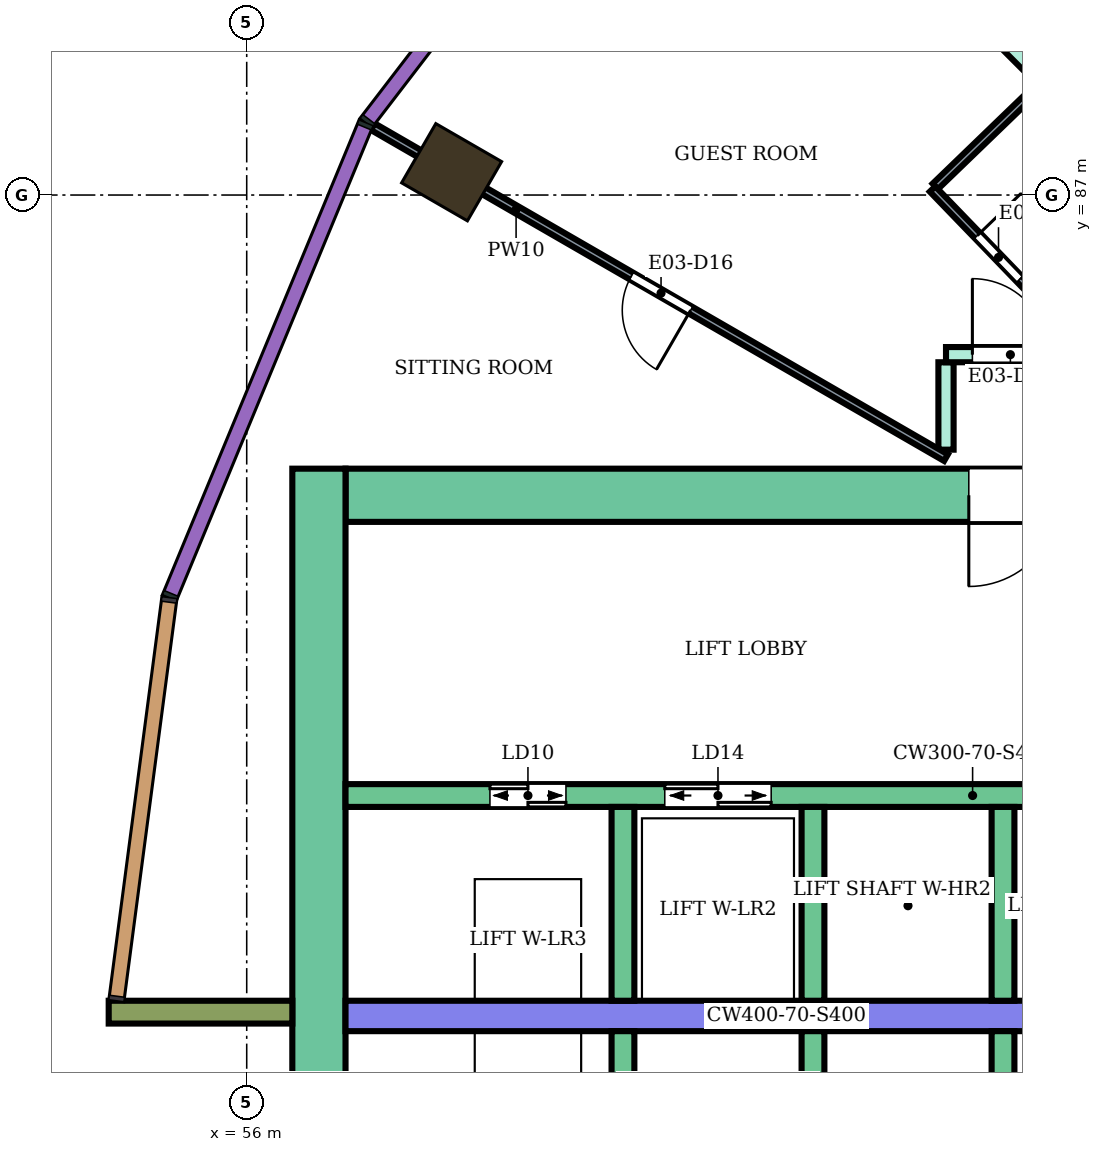
"""IFC4 building model, lengths in metres.
Left out: names, types, materials, properties, quantities, classifications, styles, units other than length and angle.
Written with IfcOpenShell. Run it as: python <this file> out.ifc"""

import sys

from ifc_helpers import new_model, si_unit, direction, frame, frame_2d, origin, origin_2d, place, context, subcontext, project, spatial, rectangle, extrude, element, fill, save


model = new_model("IFC4")
c1 = context("Model", 3, precision=1e-05, world=origin(), true_north=direction((0.0, 1.0)))
c2 = subcontext(c1, "Body", "Model", "MODEL_VIEW")
j1 = project(units=[si_unit("LENGTHUNIT", "METRE"), si_unit("PLANEANGLEUNIT", "RADIAN")], contexts=[c1])
p1 = place(None, origin())
s1 = spatial("IfcSite", under=j1, at=p1, CompositionType="ELEMENT")
p2 = place(p1, origin())
s2 = spatial("IfcBuilding", under=s1, at=p2, CompositionType="ELEMENT")
p3 = place(p2, frame((0.0, 0.0, 145.8)))
s3 = spatial("IfcBuildingStorey", under=s2, at=p3, CompositionType="ELEMENT", Elevation=145.8)
p4 = place(p3, frame((58.696, 87.3, 0.0), z_axis=(0.0, 0.0, 1.0), x_axis=(-0.866025403784, 0.5, 0.0)))
e1 = element("IfcColumn", 1, at=p4, inside=s3, PredefinedType="COLUMN", context=c2, shape_type="SweptSolid", body=[
    extrude(rectangle(XDim=1.0, YDim=0.9, at=origin_2d()), origin(), (0.0, 0.0, 1.0), 3.9),
])
p5 = place(p3, frame((72.1, 83.05, 0.0), z_axis=(0.0, 0.0, 1.0), x_axis=(-1.0, 0.0, 0.0)))
e2 = element("IfcWall", 2, at=p5, inside=s3, PredefinedType="SHEAR", context=c2, shape_type="SweptSolid", body=[
    extrude(rectangle(XDim=14.8, YDim=0.7, at=frame_2d((7.4, 0.0))), origin(), (0.0, 0.0, 1.0), 3.5),
])
p6 = place(p5, frame((4.2, 0.0, 0.0)))
e3 = element("IfcOpeningElement", 3, at=p6, cuts=e2, PredefinedType="OPENING", context=c2, shape_type="SweptSolid", body=[
    extrude(rectangle(XDim=2.4, YDim=2.4, at=frame_2d((1.2, 1.2))), frame((0.0, 0.36, 0.0), z_axis=(0.0, -1.0, 0.0), x_axis=(1.0, 0.0, 0.0)), (0.0, 0.0, 1.0), 0.72),
])
p7 = place(p3, frame((56.95, 83.4, 0.0), z_axis=(0.0, 0.0, 1.0), x_axis=(0.0, -1.0, 0.0)))
e4 = element("IfcWall", 4, at=p7, inside=s3, PredefinedType="SHEAR", context=c2, shape_type="SweptSolid", body=[
    extrude(rectangle(XDim=16.8, YDim=0.7, at=frame_2d((8.4, 0.0))), origin(), (0.0, 0.0, 1.0), 3.5),
])
p8 = place(p3, frame((68.3, 76.2, 0.0), z_axis=(0.0, 0.0, 1.0), x_axis=(-1.0, 0.0, 0.0)))
e5 = element("IfcWall", 5, at=p8, inside=s3, PredefinedType="SHEAR", context=c2, shape_type="SweptSolid", body=[
    extrude(rectangle(XDim=11.0, YDim=0.4, at=frame_2d((5.5, 0.0))), origin(), (0.0, 0.0, 1.0), 3.5),
])
p9 = place(p3, frame((68.3, 79.1, 0.0), z_axis=(0.0, 0.0, 1.0), x_axis=(-1.0, 0.0, 0.0)))
e6 = element("IfcWall", 6, at=p9, inside=s3, PredefinedType="SHEAR", context=c2, shape_type="SweptSolid", body=[
    extrude(rectangle(XDim=11.0, YDim=0.3, at=frame_2d((5.5, 0.0))), origin(), (0.0, 0.0, 1.0), 3.5),
])
p10 = place(p9, frame((0.4, 0.0, 0.0)))
e7 = element("IfcOpeningElement", 7, at=p10, cuts=e6, PredefinedType="OPENING", context=c2, shape_type="SweptSolid", body=[
    extrude(rectangle(XDim=1.4, YDim=2.1, at=frame_2d((0.7, 1.05))), frame((0.0, 0.16, 0.0), z_axis=(0.0, -1.0, 0.0), x_axis=(1.0, 0.0, 0.0)), (0.0, 0.0, 1.0), 0.32),
])
p11 = place(p9, frame((5.4, 0.0, 0.0)))
e8 = element("IfcOpeningElement", 8, at=p11, cuts=e6, PredefinedType="OPENING", context=c2, shape_type="SweptSolid", body=[
    extrude(rectangle(XDim=1.4, YDim=2.1, at=frame_2d((0.7, 1.05))), frame((0.0, 0.16, 0.0), z_axis=(0.0, -1.0, 0.0), x_axis=(1.0, 0.0, 0.0)), (0.0, 0.0, 1.0), 0.32),
])
p12 = place(p9, frame((8.1, 0.0, 0.0)))
e9 = element("IfcOpeningElement", 9, at=p12, cuts=e6, PredefinedType="OPENING", context=c2, shape_type="SweptSolid", body=[
    extrude(rectangle(XDim=1.0, YDim=2.1, at=frame_2d((0.5, 1.05))), frame((0.0, 0.16, 0.0), z_axis=(0.0, -1.0, 0.0), x_axis=(1.0, 0.0, 0.0)), (0.0, 0.0, 1.0), 0.32),
])
for number, where, z_axis, x_axis in (
    (10, (65.95, 76.0, 0.0), (0.0, 0.0, 1.0), (0.0, -1.0, 0.0)),
    (11, (63.45, 76.0, 0.0), (0.0, 0.0, 1.0), (0.0, -1.0, 0.0)),
    (12, (60.95, 76.0, 0.0), (0.0, 0.0, 1.0), (0.0, -1.0, 0.0)),
    (13, (65.95, 78.95, 0.0), (0.0, 0.0, 1.0), (0.0, -1.0, 0.0)),
    (14, (63.45, 78.95, 0.0), (0.0, 0.0, 1.0), (0.0, -1.0, 0.0)),
    (15, (60.95, 78.95, 0.0), (0.0, 0.0, 1.0), (0.0, -1.0, 0.0)),
):
    element("IfcWall", number, at=place(p3, frame(where, z_axis=z_axis, x_axis=x_axis)), inside=s3, PredefinedType="SHEAR", context=c2, shape_type="SweptSolid", body=[
        extrude(rectangle(XDim=2.55, YDim=0.3, at=frame_2d((1.275, 0.0))), origin(), (0.0, 0.0, 1.0), 3.5),
    ])
p13 = place(p3, frame((56.6, 76.25, 0.0), z_axis=(0.0, 0.0, 1.0), x_axis=(-1.0, 0.0, 0.0)))
e16 = element("IfcWall", 16, at=p13, inside=s3, PredefinedType="NOTDEFINED", context=c2, shape_type="SweptSolid", body=[
    extrude(rectangle(XDim=2.416, YDim=0.3, at=frame_2d((1.208, 0.0))), origin(), (0.0, 0.0, 1.0), 3.9),
])
p14 = place(p3, frame((63.596, 91.406, 0.0), z_axis=(0.0, 0.0, 1.0), x_axis=(0.706963264491, -0.707250268759, 0.0)))
e17 = element("IfcWall", 17, at=p14, inside=s3, PredefinedType="PARTITIONING", context=c2, shape_type="SweptSolid", body=[
    extrude(rectangle(XDim=6.805, YDim=0.2, at=frame_2d((3.403, 0.0))), origin(), (0.0, 0.0, 1.0), 3.45),
])
p15 = place(p3, frame((65.2, 83.65, 0.0), z_axis=(0.0, 0.0, 1.0), x_axis=(0.0, 1.0, 0.0)))
e18 = element("IfcWall", 18, at=p15, inside=s3, PredefinedType="PARTITIONING", context=c2, shape_type="SweptSolid", body=[
    extrude(rectangle(XDim=1.15, YDim=0.2, at=frame_2d((0.575, 0.0))), origin(), (0.0, 0.0, 1.0), 3.45),
])
p16 = place(p3, frame((65.2, 84.9, 0.0), z_axis=(0.0, 0.0, 1.0), x_axis=(1.0, 0.0, 0.0)))
e19 = element("IfcWall", 19, at=p16, inside=s3, PredefinedType="PARTITIONING", context=c2, shape_type="SweptSolid", body=[
    extrude(rectangle(XDim=1.537, YDim=0.2, at=frame_2d((0.769, 0.0))), origin(), (0.0, 0.0, 1.0), 3.45),
])
p17 = place(p16, frame((0.347, 0.0, 0.0)))
e20 = element("IfcOpeningElement", 20, at=p17, cuts=e19, PredefinedType="OPENING", context=c2, shape_type="SweptSolid", body=[
    extrude(rectangle(XDim=1.0, YDim=2.1, at=frame_2d((0.5, 1.05))), frame((0.0, 0.11, 0.0), z_axis=(0.0, -1.0, 0.0), x_axis=(1.0, 0.0, 0.0)), (0.0, 0.0, 1.0), 0.22),
])
p18 = place(p3, frame((57.659, 87.899, 0.0), z_axis=(0.0, 0.0, 1.0), x_axis=(0.86602264145, -0.500004784474, 0.0)))
e21 = element("IfcWall", 21, at=p18, inside=s3, PredefinedType="PARTITIONING", context=c2, shape_type="SweptSolid", body=[
    extrude(rectangle(XDim=8.708, YDim=0.1, at=frame_2d((4.354, 0.0))), origin(), (0.0, 0.0, 1.0), 3.45),
])
p19 = place(p18, frame((3.929, 0.0, 0.0)))
e22 = element("IfcOpeningElement", 22, at=p19, cuts=e21, PredefinedType="OPENING", context=c2, shape_type="SweptSolid", body=[
    extrude(rectangle(XDim=0.9, YDim=2.1, at=frame_2d((0.45, 1.05))), frame((0.0, 0.06, 0.0), z_axis=(0.0, -1.0, 0.0), x_axis=(1.0, 0.0, 0.0)), (0.0, 0.0, 1.0), 0.12),
])
p20 = place(p3, frame((65.059, 87.114, 0.0), z_axis=(0.0, 0.0, 1.0), x_axis=(0.719653890619, 0.694332973232, 0.0)))
e23 = element("IfcWall", 23, at=p20, inside=s3, PredefinedType="PARTITIONING", context=c2, shape_type="SweptSolid", body=[
    extrude(rectangle(XDim=1.899, YDim=0.1, at=frame_2d((0.95, 0.0))), origin(), (0.0, 0.0, 1.0), 3.45),
])
p21 = place(p3, frame((65.023, 87.079, 0.0), z_axis=(0.0, 0.0, 1.0), x_axis=(0.694287838235, -0.719697434815, 0.0)))
e24 = element("IfcWall", 24, at=p21, inside=s3, PredefinedType="PARTITIONING", context=c2, shape_type="SweptSolid", body=[
    extrude(rectangle(XDim=2.7, YDim=0.1, at=frame_2d((1.35, 0.0))), origin(), (0.0, 0.0, 1.0), 3.45),
])
p22 = place(p21, frame((0.85, 0.0, 0.0)))
e25 = element("IfcOpeningElement", 25, at=p22, cuts=e24, PredefinedType="OPENING", context=c2, shape_type="SweptSolid", body=[
    extrude(rectangle(XDim=0.8, YDim=2.1, at=frame_2d((0.4, 1.05))), frame((0.0, 0.06, 0.0), z_axis=(0.0, -1.0, 0.0), x_axis=(1.0, 0.0, 0.0)), (0.0, 0.0, 1.0), 0.12),
])
p23 = place(p17, origin())
e26 = element("IfcDoor", 26, at=p23, inside=s3, OperationType="SINGLE_SWING_LEFT", PredefinedType="DOOR", context=c2, shape_type="SweptSolid", body=[
    extrude(rectangle(XDim=1.0, YDim=2.1, at=frame_2d((0.5, 1.05))), frame((0.0, 0.025, 0.0), z_axis=(0.0, -1.0, 0.0), x_axis=(1.0, 0.0, 0.0)), (0.0, 0.0, 1.0), 0.05),
])
fill(e20, e26)
p24 = place(p22, origin())
e27 = element("IfcDoor", 27, at=p24, inside=s3, OperationType="SINGLE_SWING_LEFT", PredefinedType="DOOR", context=c2, shape_type="SweptSolid", body=[
    extrude(rectangle(XDim=0.8, YDim=2.1, at=frame_2d((0.4, 1.05))), frame((0.0, 0.025, 0.0), z_axis=(0.0, -1.0, 0.0), x_axis=(1.0, 0.0, 0.0)), (0.0, 0.0, 1.0), 0.05),
])
fill(e25, e27)
p25 = place(p19, frame((0.9, 0.0, 0.0), z_axis=(0.0, 0.0, 1.0), x_axis=(-1.0, 0.0, 0.0)))
e28 = element("IfcDoor", 28, at=p25, inside=s3, OperationType="SINGLE_SWING_LEFT", PredefinedType="DOOR", context=c2, shape_type="SweptSolid", body=[
    extrude(rectangle(XDim=0.9, YDim=2.1, at=frame_2d((0.45, 1.05))), frame((0.0, 0.025, 0.0), z_axis=(0.0, -1.0, 0.0), x_axis=(1.0, 0.0, 0.0)), (0.0, 0.0, 1.0), 0.05),
])
fill(e22, e28)
p26 = place(p11, origin())
e29 = element("IfcDoor", 29, at=p26, inside=s3, OperationType="DOUBLE_DOOR_SLIDING", PredefinedType="DOOR", context=c2, shape_type="SweptSolid", body=[
    extrude(rectangle(XDim=1.4, YDim=2.1, at=frame_2d((0.7, 1.05))), frame((0.0, 0.025, 0.0), z_axis=(0.0, -1.0, 0.0), x_axis=(1.0, 0.0, 0.0)), (0.0, 0.0, 1.0), 0.05),
])
fill(e8, e29)
p27 = place(p12, origin())
e30 = element("IfcDoor", 30, at=p27, inside=s3, OperationType="DOUBLE_DOOR_SLIDING", PredefinedType="DOOR", context=c2, shape_type="SweptSolid", body=[
    extrude(rectangle(XDim=1.0, YDim=2.1, at=frame_2d((0.5, 1.05))), frame((0.0, 0.025, 0.0), z_axis=(0.0, -1.0, 0.0), x_axis=(1.0, 0.0, 0.0)), (0.0, 0.0, 1.0), 0.05),
])
fill(e9, e30)
p28 = place(p6, origin())
e31 = element("IfcDoor", 31, at=p28, inside=s3, OperationType="DOUBLE_DOOR_SINGLE_SWING", PredefinedType="DOOR", context=c2, shape_type="SweptSolid", body=[
    extrude(rectangle(XDim=2.4, YDim=2.4, at=frame_2d((1.2, 1.2))), frame((0.0, 0.025, 0.0), z_axis=(0.0, -1.0, 0.0), x_axis=(1.0, 0.0, 0.0)), (0.0, 0.0, 1.0), 0.05),
])
fill(e3, e31)
save(model, sys.argv[1])
